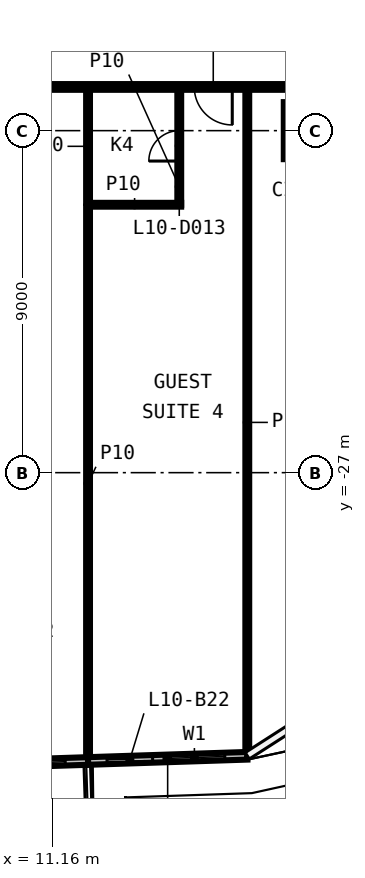
"""IFC4 building model, lengths in metres.
Left out: names, types, materials, properties, quantities, classifications, styles, units other than length and angle.
Written with IfcOpenShell. Run it as: python <this file> out.ifc"""

import sys

from ifc_helpers import new_model, si_unit, direction, frame, frame_2d, origin, origin_2d, place, context, subcontext, project, spatial, rectangle, extrude, element, fill, save


model = new_model("IFC4")
c1 = context("Model", 3, precision=1e-05, world=origin(), true_north=direction((0.0, 1.0)))
c2 = subcontext(c1, "Body", "Model", "MODEL_VIEW")
j1 = project(units=[si_unit("LENGTHUNIT", "METRE"), si_unit("PLANEANGLEUNIT", "RADIAN")], contexts=[c1])
p1 = place(None, origin())
s1 = spatial("IfcSite", under=j1, at=p1, CompositionType="ELEMENT")
p2 = place(p1, origin())
s2 = spatial("IfcBuilding", under=s1, at=p2, CompositionType="ELEMENT")
p3 = place(p2, frame((0.0, 0.0, 58.8)))
s3 = spatial("IfcBuildingStorey", under=s2, at=p3, CompositionType="ELEMENT", Elevation=58.8)
p4 = place(p3, frame((18.0, -18.0, 0.0), z_axis=(0.0, 0.0, 1.0), x_axis=(1.0, 0.0, 0.0)))
e1 = element("IfcColumn", 1, at=p4, inside=s3, PredefinedType="COLUMN", context=c2, shape_type="SweptSolid", body=[
    extrude(rectangle(XDim=1.5, YDim=1.5, at=origin_2d()), origin(), (0.0, 0.0, 1.0), 3.3),
])
p5 = place(p3, frame((12.099, -19.95, 0.0), z_axis=(0.0, 0.0, 1.0), x_axis=(1.0, 0.0, 0.0)))
e2 = element("IfcWall", 2, at=p5, inside=s3, PredefinedType="PARTITIONING", context=c2, shape_type="SweptSolid", body=[
    extrude(rectangle(XDim=2.45, YDim=0.1, at=frame_2d((1.225, 0.0))), origin(), (0.0, 0.0, 1.0), 3.3),
])
p6 = place(p3, frame((19.925, -16.85, 0.0), z_axis=(0.0, 0.0, 1.0), x_axis=(-1.0, 0.0, 0.0)))
e3 = element("IfcWall", 3, at=p6, inside=s3, PredefinedType="PARTITIONING", context=c2, shape_type="SweptSolid", body=[
    extrude(rectangle(XDim=39.85, YDim=0.15, at=frame_2d((19.925, 0.0))), origin(), (0.0, 0.0, 1.0), 3.3),
])
p7 = place(p6, frame((35.041, 0.0, 0.0)))
e4 = element("IfcOpeningElement", 4, at=p7, cuts=e3, PredefinedType="OPENING", context=c2, shape_type="SweptSolid", body=[
    extrude(rectangle(XDim=0.9, YDim=2.1, at=frame_2d((0.45, 1.05))), frame((0.0, 0.085, 0.0), z_axis=(0.0, -1.0, 0.0), x_axis=(1.0, 0.0, 0.0)), (0.0, 0.0, 1.0), 0.17),
])
p8 = place(p6, frame((31.0, 0.0, 0.0)))
e5 = element("IfcOpeningElement", 5, at=p8, cuts=e3, PredefinedType="OPENING", context=c2, shape_type="SweptSolid", body=[
    extrude(rectangle(XDim=1.0, YDim=2.1, at=frame_2d((0.5, 1.05))), frame((0.0, 0.085, 0.0), z_axis=(0.0, -1.0, 0.0), x_axis=(1.0, 0.0, 0.0)), (0.0, 0.0, 1.0), 0.17),
])
p9 = place(p6, frame((25.711, 0.0, 0.0)))
e6 = element("IfcOpeningElement", 6, at=p9, cuts=e3, PredefinedType="OPENING", context=c2, shape_type="SweptSolid", body=[
    extrude(rectangle(XDim=0.9, YDim=2.1, at=frame_2d((0.45, 1.05))), frame((0.0, 0.085, 0.0), z_axis=(0.0, -1.0, 0.0), x_axis=(1.0, 0.0, 0.0)), (0.0, 0.0, 1.0), 0.17),
])
p10 = place(p6, frame((22.072, 0.0, 0.0)))
e7 = element("IfcOpeningElement", 7, at=p10, cuts=e3, PredefinedType="OPENING", context=c2, shape_type="SweptSolid", body=[
    extrude(rectangle(XDim=0.9, YDim=2.1, at=frame_2d((0.45, 1.05))), frame((0.0, 0.085, 0.0), z_axis=(0.0, -1.0, 0.0), x_axis=(1.0, 0.0, 0.0)), (0.0, 0.0, 1.0), 0.17),
])
p11 = place(p6, frame((17.034, 0.0, 0.0)))
e8 = element("IfcOpeningElement", 8, at=p11, cuts=e3, PredefinedType="OPENING", context=c2, shape_type="SweptSolid", body=[
    extrude(rectangle(XDim=0.9, YDim=2.1, at=frame_2d((0.45, 1.05))), frame((0.0, 0.085, 0.0), z_axis=(0.0, -1.0, 0.0), x_axis=(1.0, 0.0, 0.0)), (0.0, 0.0, 1.0), 0.17),
])
p12 = place(p6, frame((13.675, 0.0, 0.0)))
e9 = element("IfcOpeningElement", 9, at=p12, cuts=e3, PredefinedType="OPENING", context=c2, shape_type="SweptSolid", body=[
    extrude(rectangle(XDim=0.9, YDim=2.1, at=frame_2d((0.45, 1.05))), frame((0.0, 0.085, 0.0), z_axis=(0.0, -1.0, 0.0), x_axis=(1.0, 0.0, 0.0)), (0.0, 0.0, 1.0), 0.17),
])
p13 = place(p6, frame((4.031, 0.0, 0.0)))
e10 = element("IfcOpeningElement", 10, at=p13, cuts=e3, PredefinedType="OPENING", context=c2, shape_type="SweptSolid", body=[
    extrude(rectangle(XDim=1.0, YDim=2.1, at=frame_2d((0.5, 1.05))), frame((0.0, 0.085, 0.0), z_axis=(0.0, -1.0, 0.0), x_axis=(1.0, 0.0, 0.0)), (0.0, 0.0, 1.0), 0.17),
])
p14 = place(p3, frame((16.289, -34.43, 0.0), z_axis=(0.0, 0.0, 1.0), x_axis=(0.0, 1.0, 0.0)))
e11 = element("IfcWall", 11, at=p14, inside=s3, PredefinedType="PARTITIONING", context=c2, shape_type="SweptSolid", body=[
    extrude(rectangle(XDim=17.505, YDim=0.1, at=frame_2d((8.752, 0.0))), origin(), (0.0, 0.0, 1.0), 3.3),
])
p15 = place(p3, frame((14.499, -19.95, 0.0), z_axis=(0.0, 0.0, 1.0), x_axis=(0.0, 1.0, 0.0)))
e12 = element("IfcWall", 12, at=p15, inside=s3, PredefinedType="PARTITIONING", context=c2, shape_type="SweptSolid", body=[
    extrude(rectangle(XDim=3.025, YDim=0.1, at=frame_2d((1.512, 0.0))), origin(), (0.0, 0.0, 1.0), 3.3),
])
p16 = place(p15, frame((1.15, 0.0, 0.0)))
e13 = element("IfcOpeningElement", 13, at=p16, cuts=e12, PredefinedType="OPENING", context=c2, shape_type="SweptSolid", body=[
    extrude(rectangle(XDim=0.8, YDim=2.1, at=frame_2d((0.4, 1.05))), frame((0.0, 0.06, 0.0), z_axis=(0.0, -1.0, 0.0), x_axis=(1.0, 0.0, 0.0)), (0.0, 0.0, 1.0), 0.12),
])
p17 = place(p3, frame((12.099, -34.567, 0.0), z_axis=(0.0, 0.0, 1.0), x_axis=(0.0, 1.0, 0.0)))
e14 = element("IfcWall", 14, at=p17, inside=s3, PredefinedType="PARTITIONING", context=c2, shape_type="SweptSolid", body=[
    extrude(rectangle(XDim=14.567, YDim=0.1, at=frame_2d((7.284, 0.0))), origin(), (0.0, 0.0, 1.0), 3.3),
])
p18 = place(p3, frame((12.099, -19.9, 0.0), z_axis=(0.0, 0.0, 1.0), x_axis=(0.0, 1.0, 0.0)))
e15 = element("IfcWall", 15, at=p18, inside=s3, PredefinedType="PARTITIONING", context=c2, shape_type="SweptSolid", body=[
    extrude(rectangle(XDim=2.975, YDim=0.1, at=frame_2d((1.487, 0.0))), origin(), (0.0, 0.0, 1.0), 3.3),
])
p19 = place(p3, frame((-4.697, -35.136, 0.0), z_axis=(0.0, 0.0, 1.0), x_axis=(0.999466983916, 0.032645796998, 0.0)))
e16 = element("IfcWall", 16, at=p19, inside=s3, PredefinedType="SOLIDWALL", context=c2, shape_type="SweptSolid", body=[
    extrude(rectangle(XDim=16.804, YDim=0.2, at=frame_2d((8.402, 0.0))), origin(), (0.0, 0.0, 1.0), 3.3),
])
p20 = place(p19, frame((2.0, 0.0, 0.6)))
e17 = element("IfcOpeningElement", 17, at=p20, cuts=e16, PredefinedType="OPENING", context=c2, shape_type="SweptSolid", body=[
    extrude(rectangle(XDim=1.6, YDim=2.4, at=frame_2d((0.8, 1.2))), frame((0.0, 0.11, 0.0), z_axis=(0.0, -1.0, 0.0), x_axis=(1.0, 0.0, 0.0)), (0.0, 0.0, 1.0), 0.22),
])
p21 = place(p19, frame((0.5, 0.0, 0.0)))
e18 = element("IfcOpeningElement", 18, at=p21, cuts=e16, PredefinedType="OPENING", context=c2, shape_type="SweptSolid", body=[
    extrude(rectangle(XDim=1.2, YDim=2.4, at=frame_2d((0.6, 1.2))), frame((0.0, 0.11, 0.0), z_axis=(0.0, -1.0, 0.0), x_axis=(1.0, 0.0, 0.0)), (0.0, 0.0, 1.0), 0.22),
])
p22 = place(p19, frame((6.201, 0.0, 0.6)))
e19 = element("IfcOpeningElement", 19, at=p22, cuts=e16, PredefinedType="OPENING", context=c2, shape_type="SweptSolid", body=[
    extrude(rectangle(XDim=1.6, YDim=2.4, at=frame_2d((0.8, 1.2))), frame((0.0, 0.11, 0.0), z_axis=(0.0, -1.0, 0.0), x_axis=(1.0, 0.0, 0.0)), (0.0, 0.0, 1.0), 0.22),
])
p23 = place(p19, frame((4.701, 0.0, 0.0)))
e20 = element("IfcOpeningElement", 20, at=p23, cuts=e16, PredefinedType="OPENING", context=c2, shape_type="SweptSolid", body=[
    extrude(rectangle(XDim=1.2, YDim=2.4, at=frame_2d((0.6, 1.2))), frame((0.0, 0.11, 0.0), z_axis=(0.0, -1.0, 0.0), x_axis=(1.0, 0.0, 0.0)), (0.0, 0.0, 1.0), 0.22),
])
p24 = place(p19, frame((10.402, 0.0, 0.6)))
e21 = element("IfcOpeningElement", 21, at=p24, cuts=e16, PredefinedType="OPENING", context=c2, shape_type="SweptSolid", body=[
    extrude(rectangle(XDim=1.6, YDim=2.4, at=frame_2d((0.8, 1.2))), frame((0.0, 0.11, 0.0), z_axis=(0.0, -1.0, 0.0), x_axis=(1.0, 0.0, 0.0)), (0.0, 0.0, 1.0), 0.22),
])
p25 = place(p19, frame((8.902, 0.0, 0.0)))
e22 = element("IfcOpeningElement", 22, at=p25, cuts=e16, PredefinedType="OPENING", context=c2, shape_type="SweptSolid", body=[
    extrude(rectangle(XDim=1.2, YDim=2.4, at=frame_2d((0.6, 1.2))), frame((0.0, 0.11, 0.0), z_axis=(0.0, -1.0, 0.0), x_axis=(1.0, 0.0, 0.0)), (0.0, 0.0, 1.0), 0.22),
])
p26 = place(p19, frame((14.603, 0.0, 0.6)))
e23 = element("IfcOpeningElement", 23, at=p26, cuts=e16, PredefinedType="OPENING", context=c2, shape_type="SweptSolid", body=[
    extrude(rectangle(XDim=1.6, YDim=2.4, at=frame_2d((0.8, 1.2))), frame((0.0, 0.11, 0.0), z_axis=(0.0, -1.0, 0.0), x_axis=(1.0, 0.0, 0.0)), (0.0, 0.0, 1.0), 0.22),
])
p27 = place(p19, frame((12.903, 0.0, 0.0)))
e24 = element("IfcOpeningElement", 24, at=p27, cuts=e16, PredefinedType="OPENING", context=c2, shape_type="SweptSolid", body=[
    extrude(rectangle(XDim=1.2, YDim=2.4, at=frame_2d((0.6, 1.2))), frame((0.0, 0.11, 0.0), z_axis=(0.0, -1.0, 0.0), x_axis=(1.0, 0.0, 0.0)), (0.0, 0.0, 1.0), 0.22),
])
p28 = place(p3, frame((12.099, -34.587, 0.0), z_axis=(0.0, 0.0, 1.0), x_axis=(0.999468058802, 0.032612872214, 0.0)))
e25 = element("IfcWall", 25, at=p28, inside=s3, PredefinedType="SOLIDWALL", context=c2, shape_type="SweptSolid", body=[
    extrude(rectangle(XDim=4.192, YDim=0.2, at=frame_2d((2.096, 0.0))), origin(), (0.0, 0.0, 1.0), 3.3),
])
p29 = place(p28, frame((2.0, 0.0, 0.6)))
e26 = element("IfcOpeningElement", 26, at=p29, cuts=e25, PredefinedType="OPENING", context=c2, shape_type="SweptSolid", body=[
    extrude(rectangle(XDim=1.6, YDim=2.4, at=frame_2d((0.8, 1.2))), frame((0.0, 0.11, 0.0), z_axis=(0.0, -1.0, 0.0), x_axis=(1.0, 0.0, 0.0)), (0.0, 0.0, 1.0), 0.22),
])
p30 = place(p28, frame((0.5, 0.0, 0.0)))
e27 = element("IfcOpeningElement", 27, at=p30, cuts=e25, PredefinedType="OPENING", context=c2, shape_type="SweptSolid", body=[
    extrude(rectangle(XDim=1.2, YDim=2.4, at=frame_2d((0.6, 1.2))), frame((0.0, 0.11, 0.0), z_axis=(0.0, -1.0, 0.0), x_axis=(1.0, 0.0, 0.0)), (0.0, 0.0, 1.0), 0.22),
])
p31 = place(p16, origin())
e28 = element("IfcDoor", 28, at=p31, inside=s3, OperationType="SINGLE_SWING_LEFT", PredefinedType="DOOR", context=c2, shape_type="SweptSolid", body=[
    extrude(rectangle(XDim=0.8, YDim=2.1, at=frame_2d((0.4, 1.05))), frame((0.0, 0.025, 0.0), z_axis=(0.0, -1.0, 0.0), x_axis=(1.0, 0.0, 0.0)), (0.0, 0.0, 1.0), 0.05),
])
fill(e13, e28)
p32 = place(p13, origin())
e29 = element("IfcDoor", 29, at=p32, inside=s3, OperationType="SINGLE_SWING_RIGHT", PredefinedType="DOOR", context=c2, shape_type="SweptSolid", body=[
    extrude(rectangle(XDim=1.0, YDim=2.1, at=frame_2d((0.5, 1.05))), frame((0.0, 0.025, 0.0), z_axis=(0.0, -1.0, 0.0), x_axis=(1.0, 0.0, 0.0)), (0.0, 0.0, 1.0), 0.05),
])
fill(e10, e29)
p33 = place(p26, origin())
e30 = element("IfcWindow", 30, at=p33, inside=s3, PartitioningType="SINGLE_PANEL", PredefinedType="WINDOW", context=c2, shape_type="SweptSolid", body=[
    extrude(rectangle(XDim=1.6, YDim=2.4, at=frame_2d((0.8, 1.2))), frame((0.0, 0.03, 0.0), z_axis=(0.0, -1.0, 0.0), x_axis=(1.0, 0.0, 0.0)), (0.0, 0.0, 1.0), 0.06),
])
fill(e23, e30)
p34 = place(p29, origin())
e31 = element("IfcWindow", 31, at=p34, inside=s3, PartitioningType="SINGLE_PANEL", PredefinedType="WINDOW", context=c2, shape_type="SweptSolid", body=[
    extrude(rectangle(XDim=1.6, YDim=2.4, at=frame_2d((0.8, 1.2))), frame((0.0, 0.03, 0.0), z_axis=(0.0, -1.0, 0.0), x_axis=(1.0, 0.0, 0.0)), (0.0, 0.0, 1.0), 0.06),
])
fill(e26, e31)
p35 = place(p30, origin())
e32 = element("IfcDoor", 32, at=p35, inside=s3, OperationType="SLIDING_TO_LEFT", PredefinedType="DOOR", context=c2, shape_type="SweptSolid", body=[
    extrude(rectangle(XDim=1.2, YDim=2.4, at=frame_2d((0.6, 1.2))), frame((0.0, 0.025, 0.0), z_axis=(0.0, -1.0, 0.0), x_axis=(1.0, 0.0, 0.0)), (0.0, 0.0, 1.0), 0.05),
])
fill(e27, e32)
save(model, sys.argv[1])
